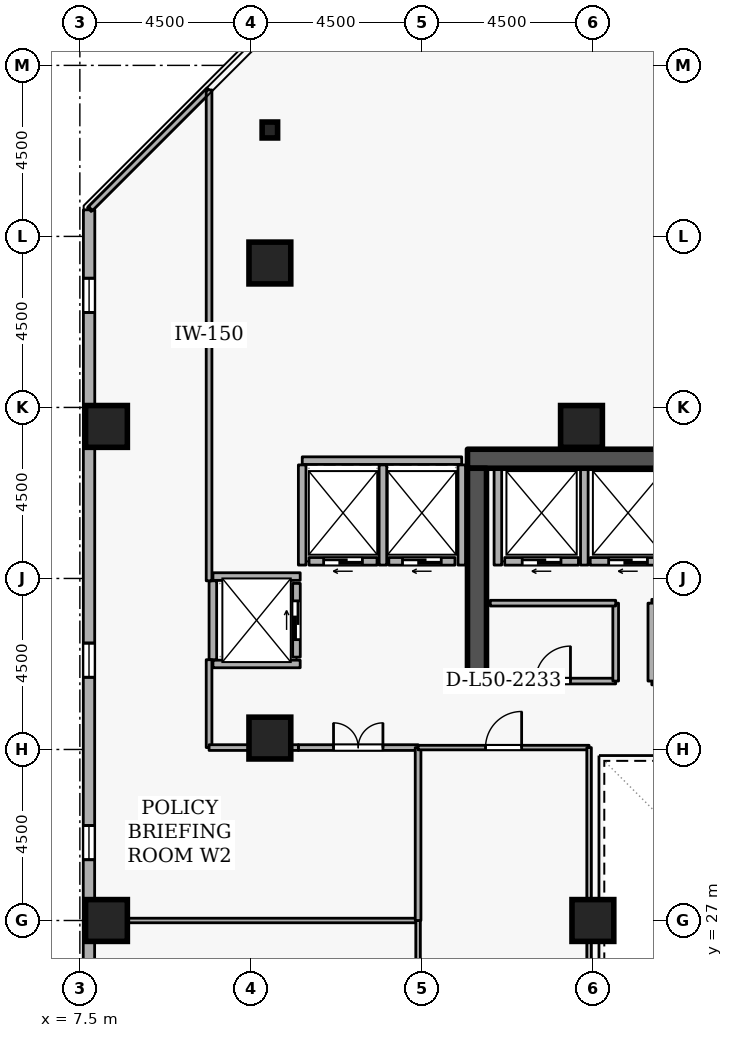
"""IFC4 building model, lengths in metres.
Left out: names, types, materials, properties, quantities, classifications, styles, units other than length and angle.
Written with IfcOpenShell. Run it as: python <this file> out.ifc"""

import sys

from ifc_helpers import new_model, si_unit, direction, frame, frame_2d, origin, origin_2d, place, context, subcontext, project, spatial, rectangle, i_section, extrude, element, fill, save


model = new_model("IFC4")
c1 = context("Model", 3, precision=1e-05, world=origin(), true_north=direction((0.0, 1.0)))
c2 = subcontext(c1, "Body", "Model", "MODEL_VIEW")
j1 = project(units=[si_unit("LENGTHUNIT", "METRE"), si_unit("PLANEANGLEUNIT", "RADIAN")], contexts=[c1])
p1 = place(None, origin())
s1 = spatial("IfcSite", under=j1, at=p1, CompositionType="ELEMENT")
p2 = place(p1, origin())
s2 = spatial("IfcBuilding", under=s1, at=p2, CompositionType="ELEMENT")
p3 = place(p2, frame((0.0, 0.0, 189.3)))
s3 = spatial("IfcBuildingStorey", under=s2, at=p3, CompositionType="ELEMENT", Elevation=189.3)
p4 = place(p3, frame((17.7, 39.15, 0.0), z_axis=(0.0, 0.0, 1.0), x_axis=(1.0, 0.0, 0.0)))
e1 = element("IfcWall", 1, at=p4, inside=s3, PredefinedType="SHEAR", context=c2, shape_type="SweptSolid", body=[
    extrude(rectangle(XDim=15.6, YDim=0.5, at=frame_2d((7.8, 0.0))), origin(), (0.0, 0.0, 1.0), 3.6),
])
p5 = place(p3, frame((17.95, 33.1, 0.0), z_axis=(0.0, 0.0, 1.0), x_axis=(0.0, 1.0, 0.0)))
e2 = element("IfcWall", 2, at=p5, inside=s3, PredefinedType="SHEAR", context=c2, shape_type="SweptSolid", body=[
    extrude(rectangle(XDim=5.8, YDim=0.5, at=frame_2d((2.9, 0.0))), origin(), (0.0, 0.0, 1.0), 3.6),
])
for number, where, z_axis, x_axis in (
    (3, (12.5, 44.3, 0.0), (0.0, 0.0, 1.0), (1.0, 0.0, 0.0)),
    (4, (8.2, 27.0, 0.0), (0.0, 0.0, 1.0), (1.0, 0.0, 0.0)),
    (5, (8.2, 40.0, 0.0), (0.0, 0.0, 1.0), (1.0, 0.0, 0.0)),
    (6, (12.5, 31.8, 0.0), (0.0, 0.0, 1.0), (1.0, 0.0, 0.0)),
    (7, (20.7, 40.0, 0.0), (0.0, 0.0, 1.0), (1.0, 0.0, 0.0)),
    (8, (21.0, 27.0, 0.0), (0.0, 0.0, 1.0), (1.0, 0.0, 0.0)),
):
    element("IfcColumn", number, at=place(p3, frame(where, z_axis=z_axis, x_axis=x_axis)), inside=s3, PredefinedType="COLUMN", context=c2, shape_type="SweptSolid", body=[
        extrude(rectangle(XDim=1.1, YDim=1.1, at=origin_2d()), origin(), (0.0, 0.0, 1.0), 3.6),
    ])
p6 = place(p3, frame((12.5, 47.8, 0.0), z_axis=(0.0, 0.0, 1.0), x_axis=(1.0, 0.0, 0.0)))
e9 = element("IfcColumn", 9, at=p6, inside=s3, PredefinedType="COLUMN", context=c2, shape_type="SweptSolid", body=[
    extrude(i_section(OverallWidth=0.407, OverallDepth=0.419, WebThickness=0.031, FlangeThickness=0.049, FilletRadius=0.015, at=origin_2d()), origin(), (0.0, 0.0, 1.0), 3.6),
])
p7 = place(p3, frame((7.744, 45.699, 0.0), z_axis=(0.0, 0.0, 1.0), x_axis=(-0.000244999128, -0.999999969988, 0.0)))
e10 = element("IfcWall", 10, at=p7, inside=s3, PredefinedType="STANDARD", context=c2, shape_type="SweptSolid", body=[
    extrude(rectangle(XDim=33.881, YDim=0.3, at=frame_2d((16.94, 0.0))), origin(), (0.0, 0.0, 1.0), 2.7),
])
p8 = place(p7, frame((1.8, 0.0, 0.72)))
e11 = element("IfcOpeningElement", 11, at=p8, cuts=e10, PredefinedType="OPENING", context=c2, shape_type="SweptSolid", body=[
    extrude(rectangle(XDim=0.9, YDim=1.75, at=frame_2d((0.45, 0.875))), frame((0.0, 0.16, 0.0), z_axis=(0.0, -1.0, 0.0), x_axis=(1.0, 0.0, 0.0)), (0.0, 0.0, 1.0), 0.32),
])
p9 = place(p7, frame((11.4, 0.0, 0.72)))
e12 = element("IfcOpeningElement", 12, at=p9, cuts=e10, PredefinedType="OPENING", context=c2, shape_type="SweptSolid", body=[
    extrude(rectangle(XDim=0.9, YDim=1.75, at=frame_2d((0.45, 0.875))), frame((0.0, 0.16, 0.0), z_axis=(0.0, -1.0, 0.0), x_axis=(1.0, 0.0, 0.0)), (0.0, 0.0, 1.0), 0.32),
])
p10 = place(p7, frame((16.2, 0.0, 0.72)))
e13 = element("IfcOpeningElement", 13, at=p10, cuts=e10, PredefinedType="OPENING", context=c2, shape_type="SweptSolid", body=[
    extrude(rectangle(XDim=0.9, YDim=1.75, at=frame_2d((0.45, 0.875))), frame((0.0, 0.16, 0.0), z_axis=(0.0, -1.0, 0.0), x_axis=(1.0, 0.0, 0.0)), (0.0, 0.0, 1.0), 0.32),
])
p11 = place(p7, frame((21.0, 0.0, 0.72)))
e14 = element("IfcOpeningElement", 14, at=p11, cuts=e10, PredefinedType="OPENING", context=c2, shape_type="SweptSolid", body=[
    extrude(rectangle(XDim=0.9, YDim=1.75, at=frame_2d((0.45, 0.875))), frame((0.0, 0.16, 0.0), z_axis=(0.0, -1.0, 0.0), x_axis=(1.0, 0.0, 0.0)), (0.0, 0.0, 1.0), 0.32),
])
p12 = place(p7, frame((25.8, 0.0, 0.72)))
e15 = element("IfcOpeningElement", 15, at=p12, cuts=e10, PredefinedType="OPENING", context=c2, shape_type="SweptSolid", body=[
    extrude(rectangle(XDim=0.9, YDim=1.75, at=frame_2d((0.45, 0.875))), frame((0.0, 0.16, 0.0), z_axis=(0.0, -1.0, 0.0), x_axis=(1.0, 0.0, 0.0)), (0.0, 0.0, 1.0), 0.32),
])
p13 = place(p3, frame((22.92, 36.45, 0.0), z_axis=(0.0, 0.0, 1.0), x_axis=(-1.0, 0.0, 0.0)))
e16 = element("IfcWall", 16, at=p13, inside=s3, PredefinedType="STANDARD", context=c2, shape_type="SweptSolid", body=[
    extrude(rectangle(XDim=1.99, YDim=0.2, at=frame_2d((0.995, 0.0))), origin(), (0.0, 0.0, 1.0), 3.34),
])
p14 = place(p13, frame((0.485, 0.0, 0.0)))
e17 = element("IfcOpeningElement", 17, at=p14, cuts=e16, PredefinedType="OPENING", context=c2, shape_type="SweptSolid", body=[
    extrude(rectangle(XDim=1.02, YDim=2.06, at=frame_2d((0.51, 1.03))), frame((0.0, 0.11, 0.0), z_axis=(0.0, -1.0, 0.0), x_axis=(1.0, 0.0, 0.0)), (0.0, 0.0, 1.0), 0.22),
])
p15 = place(p3, frame((20.62, 36.45, 0.0), z_axis=(0.0, 0.0, 1.0), x_axis=(-1.0, 0.0, 0.0)))
e18 = element("IfcWall", 18, at=p15, inside=s3, PredefinedType="STANDARD", context=c2, shape_type="SweptSolid", body=[
    extrude(rectangle(XDim=1.94, YDim=0.2, at=frame_2d((0.97, 0.0))), origin(), (0.0, 0.0, 1.0), 3.34),
])
p16 = place(p15, frame((0.46, 0.0, 0.0)))
e19 = element("IfcOpeningElement", 19, at=p16, cuts=e18, PredefinedType="OPENING", context=c2, shape_type="SweptSolid", body=[
    extrude(rectangle(XDim=1.02, YDim=2.06, at=frame_2d((0.51, 1.03))), frame((0.0, 0.11, 0.0), z_axis=(0.0, -1.0, 0.0), x_axis=(1.0, 0.0, 0.0)), (0.0, 0.0, 1.0), 0.22),
])
p17 = place(p3, frame((17.37, 36.45, 0.0), z_axis=(0.0, 0.0, 1.0), x_axis=(-1.0, 0.0, 0.0)))
e20 = element("IfcWall", 20, at=p17, inside=s3, PredefinedType="STANDARD", context=c2, shape_type="SweptSolid", body=[
    extrude(rectangle(XDim=1.74, YDim=0.2, at=frame_2d((0.87, 0.0))), origin(), (0.0, 0.0, 1.0), 3.34),
])
p18 = place(p17, frame((0.36, 0.0, 0.0)))
e21 = element("IfcOpeningElement", 21, at=p18, cuts=e20, PredefinedType="OPENING", context=c2, shape_type="SweptSolid", body=[
    extrude(rectangle(XDim=1.02, YDim=2.06, at=frame_2d((0.51, 1.03))), frame((0.0, 0.11, 0.0), z_axis=(0.0, -1.0, 0.0), x_axis=(1.0, 0.0, 0.0)), (0.0, 0.0, 1.0), 0.22),
])
p19 = place(p3, frame((15.32, 36.45, 0.0), z_axis=(0.0, 0.0, 1.0), x_axis=(-1.0, 0.0, 0.0)))
e22 = element("IfcWall", 22, at=p19, inside=s3, PredefinedType="STANDARD", context=c2, shape_type="SweptSolid", body=[
    extrude(rectangle(XDim=1.79, YDim=0.2, at=frame_2d((0.895, 0.0))), origin(), (0.0, 0.0, 1.0), 3.34),
])
p20 = place(p19, frame((0.385, 0.0, 0.0)))
e23 = element("IfcOpeningElement", 23, at=p20, cuts=e22, PredefinedType="OPENING", context=c2, shape_type="SweptSolid", body=[
    extrude(rectangle(XDim=1.02, YDim=2.06, at=frame_2d((0.51, 1.03))), frame((0.0, 0.11, 0.0), z_axis=(0.0, -1.0, 0.0), x_axis=(1.0, 0.0, 0.0)), (0.0, 0.0, 1.0), 0.22),
])
p21 = place(p3, frame((13.2, 33.93, 0.0), z_axis=(0.0, 0.0, 1.0), x_axis=(0.0, 1.0, 0.0)))
e24 = element("IfcWall", 24, at=p21, inside=s3, PredefinedType="STANDARD", context=c2, shape_type="SweptSolid", body=[
    extrude(rectangle(XDim=1.94, YDim=0.2, at=frame_2d((0.97, 0.0))), origin(), (0.0, 0.0, 1.0), 3.34),
])
p22 = place(p21, frame((0.46, 0.0, 0.0)))
e25 = element("IfcOpeningElement", 25, at=p22, cuts=e24, PredefinedType="OPENING", context=c2, shape_type="SweptSolid", body=[
    extrude(rectangle(XDim=1.02, YDim=2.06, at=frame_2d((0.51, 1.03))), frame((0.0, 0.11, 0.0), z_axis=(0.0, -1.0, 0.0), x_axis=(1.0, 0.0, 0.0)), (0.0, 0.0, 1.0), 0.22),
])
for number, where, z_axis, x_axis in (
    (26, (20.775, 36.352, 0.0), (0.0, 0.0, 1.0), (0.0, 1.0, 0.0)),
    (27, (18.5, 36.352, 0.0), (0.0, 0.0, 1.0), (0.0, 1.0, 0.0)),
):
    element("IfcWall", number, at=place(p3, frame(where, z_axis=z_axis, x_axis=x_axis)), inside=s3, PredefinedType="STANDARD", context=c2, shape_type="SweptSolid", body=[
        extrude(rectangle(XDim=2.536, YDim=0.2, at=frame_2d((1.268, 0.0))), origin(), (0.0, 0.0, 1.0), 3.34),
    ])
p23 = place(p3, frame((13.352, 39.1, 0.0), z_axis=(0.0, 0.0, 1.0), x_axis=(1.0, 0.0, 0.0)))
e28 = element("IfcWall", 28, at=p23, inside=s3, PredefinedType="STANDARD", context=c2, shape_type="SweptSolid", body=[
    extrude(rectangle(XDim=4.196, YDim=0.2, at=frame_2d((2.098, 0.0))), origin(), (0.0, 0.0, 1.0), 3.34),
])
p24 = place(p3, frame((17.55, 36.352, 0.0), z_axis=(0.0, 0.0, 1.0), x_axis=(0.0, 1.0, 0.0)))
e29 = element("IfcWall", 29, at=p24, inside=s3, PredefinedType="STANDARD", context=c2, shape_type="SweptSolid", body=[
    extrude(rectangle(XDim=2.636, YDim=0.2, at=frame_2d((1.318, 0.0))), origin(), (0.0, 0.0, 1.0), 2.545),
])
for number, where, z_axis, x_axis in (
    (30, (15.475, 36.352, 0.0), (0.0, 0.0, 1.0), (0.0, 1.0, 0.0)),
    (31, (13.35, 36.352, 0.0), (0.0, 0.0, 1.0), (0.0, 1.0, 0.0)),
):
    element("IfcWall", number, at=place(p3, frame(where, z_axis=z_axis, x_axis=x_axis)), inside=s3, PredefinedType="STANDARD", context=c2, shape_type="SweptSolid", body=[
        extrude(rectangle(XDim=2.636, YDim=0.2, at=frame_2d((1.318, 0.0))), origin(), (0.0, 0.0, 1.0), 3.34),
    ])
for number, where, z_axis, x_axis in (
    (32, (11.002, 36.05, 0.0), (0.0, 0.0, 1.0), (1.0, 0.0, 0.0)),
    (33, (11.002, 33.75, 0.0), (0.0, 0.0, 1.0), (1.0, 0.0, 0.0)),
):
    element("IfcWall", number, at=place(p3, frame(where, z_axis=z_axis, x_axis=x_axis)), inside=s3, PredefinedType="STANDARD", context=c2, shape_type="SweptSolid", body=[
        extrude(rectangle(XDim=2.296, YDim=0.2, at=frame_2d((1.148, 0.0))), origin(), (0.0, 0.0, 1.0), 3.34),
    ])
p25 = place(p3, frame((11.0, 33.862, 0.0), z_axis=(0.0, 0.0, 1.0), x_axis=(0.0, 1.0, 0.0)))
e34 = element("IfcWall", 34, at=p25, inside=s3, PredefinedType="STANDARD", context=c2, shape_type="SweptSolid", body=[
    extrude(rectangle(XDim=2.076, YDim=0.2, at=frame_2d((1.038, 0.0))), origin(), (0.0, 0.0, 1.0), 3.34),
])
p26 = place(p3, frame((22.55, 33.3, 0.0), z_axis=(0.0, 0.0, 1.0), x_axis=(1.0, 0.0, 0.0)))
e35 = element("IfcWall", 35, at=p26, inside=s3, PredefinedType="STANDARD", context=c2, shape_type="SweptSolid", body=[
    extrude(rectangle(XDim=1.8, YDim=0.2, at=frame_2d((0.9, 0.0))), origin(), (0.0, 0.0, 1.0), 3.34),
])
p27 = place(p26, frame((0.46, 0.0, 0.0)))
e36 = element("IfcOpeningElement", 36, at=p27, cuts=e35, PredefinedType="OPENING", context=c2, shape_type="SweptSolid", body=[
    extrude(rectangle(XDim=0.88, YDim=2.04, at=frame_2d((0.44, 1.02))), frame((0.0, 0.11, 0.0), z_axis=(0.0, -1.0, 0.0), x_axis=(1.0, 0.0, 0.0)), (0.0, 0.0, 1.0), 0.22),
])
p28 = place(p3, frame((24.35, 35.35, 0.0), z_axis=(0.0, 0.0, 1.0), x_axis=(-1.0, 0.0, 0.0)))
e37 = element("IfcWall", 37, at=p28, inside=s3, PredefinedType="STANDARD", context=c2, shape_type="SweptSolid", body=[
    extrude(rectangle(XDim=1.8, YDim=0.2, at=frame_2d((0.9, 0.0))), origin(), (0.0, 0.0, 1.0), 3.34),
])
p29 = place(p3, frame((22.55, 35.35, 0.0), z_axis=(0.0, 0.0, 1.0), x_axis=(0.0, -1.0, 0.0)))
e38 = element("IfcWall", 38, at=p29, inside=s3, PredefinedType="STANDARD", context=c2, shape_type="SweptSolid", body=[
    extrude(rectangle(XDim=2.05, YDim=0.2, at=frame_2d((1.025, 0.0))), origin(), (0.0, 0.0, 1.0), 3.34),
])
p30 = place(p3, frame((18.3, 33.3, 0.0), z_axis=(0.0, 0.0, 1.0), x_axis=(1.0, 0.0, 0.0)))
e39 = element("IfcWall", 39, at=p30, inside=s3, PredefinedType="PARTITIONING", context=c2, shape_type="SweptSolid", body=[
    extrude(rectangle(XDim=3.3, YDim=0.15, at=frame_2d((1.65, 0.0))), origin(), (0.0, 0.0, 1.0), 3.34),
])
p31 = place(p30, frame((1.19, 0.0, 0.0)))
e40 = element("IfcOpeningElement", 40, at=p31, cuts=e39, PredefinedType="OPENING", context=c2, shape_type="SweptSolid", body=[
    extrude(rectangle(XDim=0.92, YDim=2.08, at=frame_2d((0.46, 1.04))), frame((0.0, 0.085, 0.0), z_axis=(0.0, -1.0, 0.0), x_axis=(1.0, 0.0, 0.0)), (0.0, 0.0, 1.0), 0.17),
])
p32 = place(p3, frame((21.6, 33.3, 0.0), z_axis=(0.0, 0.0, 1.0), x_axis=(0.0, 1.0, 0.0)))
e41 = element("IfcWall", 41, at=p32, inside=s3, PredefinedType="PARTITIONING", context=c2, shape_type="SweptSolid", body=[
    extrude(rectangle(XDim=2.05, YDim=0.15, at=frame_2d((1.025, 0.0))), origin(), (0.0, 0.0, 1.0), 3.34),
])
p33 = place(p3, frame((21.6, 35.35, 0.0), z_axis=(0.0, 0.0, 1.0), x_axis=(-1.0, 0.0, 0.0)))
e42 = element("IfcWall", 42, at=p33, inside=s3, PredefinedType="PARTITIONING", context=c2, shape_type="SweptSolid", body=[
    extrude(rectangle(XDim=3.3, YDim=0.15, at=frame_2d((1.65, 0.0))), origin(), (0.0, 0.0, 1.0), 3.34),
])
p34 = place(p3, frame((7.78, 27.0, 0.0), z_axis=(0.0, 0.0, 1.0), x_axis=(1.0, 0.0, 0.0)))
e43 = element("IfcWall", 43, at=p34, inside=s3, PredefinedType="PARTITIONING", context=c2, shape_type="SweptSolid", body=[
    extrude(rectangle(XDim=8.62, YDim=0.12, at=frame_2d((4.31, 0.0))), origin(), (0.0, 0.0, 1.0), 2.878),
])
p35 = place(p3, frame((16.4, 27.0, 0.0), z_axis=(0.0, 0.0, 1.0), x_axis=(0.0, -1.0, 0.0)))
e44 = element("IfcWall", 44, at=p35, inside=s3, PredefinedType="PARTITIONING", context=c2, shape_type="SweptSolid", body=[
    extrude(rectangle(XDim=4.55, YDim=0.12, at=frame_2d((2.275, 0.0))), origin(), (0.0, 0.0, 1.0), 3.34),
])
p36 = place(p3, frame((13.25, 31.55, 0.0), z_axis=(0.0, 0.0, 1.0), x_axis=(1.0, 0.0, 0.0)))
e45 = element("IfcWall", 45, at=p36, inside=s3, PredefinedType="PARTITIONING", context=c2, shape_type="SweptSolid", body=[
    extrude(rectangle(XDim=3.15, YDim=0.15, at=frame_2d((1.575, 0.0))), origin(), (0.0, 0.0, 1.0), 3.34),
])
p37 = place(p36, frame((0.925, 0.0, 0.0)))
e46 = element("IfcOpeningElement", 46, at=p37, cuts=e45, PredefinedType="OPENING", context=c2, shape_type="SweptSolid", body=[
    extrude(rectangle(XDim=1.3, YDim=2.12, at=frame_2d((0.65, 1.06))), frame((0.0, 0.085, 0.0), z_axis=(0.0, -1.0, 0.0), x_axis=(1.0, 0.0, 0.0)), (0.0, 0.0, 1.0), 0.17),
])
p38 = place(p3, frame((16.4, 31.55, 0.0), z_axis=(0.0, 0.0, 1.0), x_axis=(0.0, -1.0, 0.0)))
e47 = element("IfcWall", 47, at=p38, inside=s3, PredefinedType="PARTITIONING", context=c2, shape_type="SweptSolid", body=[
    extrude(rectangle(XDim=4.55, YDim=0.15, at=frame_2d((2.275, 0.0))), origin(), (0.0, 0.0, 1.0), 3.34),
])
p39 = place(p3, frame((7.78, 45.733, 0.0), z_axis=(0.0, 0.0, 1.0), x_axis=(0.707079114978, 0.707134446312, 0.0)))
e48 = element("IfcWall", 48, at=p39, inside=s3, PredefinedType="PARTITIONING", context=c2, shape_type="SweptSolid", body=[
    extrude(rectangle(XDim=4.412, YDim=0.15, at=frame_2d((2.206, 0.0))), origin(), (0.0, 0.0, 1.0), 3.34),
])
p40 = place(p3, frame((10.9, 48.854, 0.0), z_axis=(0.0, 0.0, 1.0), x_axis=(0.0, -1.0, 0.0)))
e49 = element("IfcWall", 49, at=p40, inside=s3, PredefinedType="PARTITIONING", context=c2, shape_type="SweptSolid", body=[
    extrude(rectangle(XDim=12.916, YDim=0.15, at=frame_2d((6.458, 0.0))), origin(), (0.0, 0.0, 1.0), 3.34),
])
p41 = place(p3, frame((10.9, 33.862, 0.0), z_axis=(0.0, 0.0, 1.0), x_axis=(0.0, -1.0, 0.0)))
e50 = element("IfcWall", 50, at=p41, inside=s3, PredefinedType="PARTITIONING", context=c2, shape_type="SweptSolid", body=[
    extrude(rectangle(XDim=2.312, YDim=0.15, at=frame_2d((1.156, 0.0))), origin(), (0.0, 0.0, 1.0), 3.34),
])
p42 = place(p3, frame((10.9, 31.55, 0.0), z_axis=(0.0, 0.0, 1.0), x_axis=(1.0, 0.0, 0.0)))
e51 = element("IfcWall", 51, at=p42, inside=s3, PredefinedType="PARTITIONING", context=c2, shape_type="SweptSolid", body=[
    extrude(rectangle(XDim=2.35, YDim=0.15, at=frame_2d((1.175, 0.0))), origin(), (0.0, 0.0, 1.0), 3.34),
])
p43 = place(p3, frame((16.4, 31.55, 0.0), z_axis=(0.0, 0.0, 1.0), x_axis=(1.0, 0.0, 0.0)))
e52 = element("IfcWall", 52, at=p43, inside=s3, PredefinedType="PARTITIONING", context=c2, shape_type="SweptSolid", body=[
    extrude(rectangle(XDim=4.5, YDim=0.12, at=frame_2d((2.25, 0.0))), origin(), (0.0, 0.0, 1.0), 3.34),
])
p44 = place(p43, frame((1.775, 0.0, 0.0)))
e53 = element("IfcOpeningElement", 53, at=p44, cuts=e52, PredefinedType="OPENING", context=c2, shape_type="SweptSolid", body=[
    extrude(rectangle(XDim=0.95, YDim=2.1, at=frame_2d((0.475, 1.05))), frame((0.0, 0.07, 0.0), z_axis=(0.0, -1.0, 0.0), x_axis=(1.0, 0.0, 0.0)), (0.0, 0.0, 1.0), 0.14),
])
p45 = place(p3, frame((20.9, 31.55, 0.0), z_axis=(0.0, 0.0, 1.0), x_axis=(0.0, -1.0, 0.0)))
e54 = element("IfcWall", 54, at=p45, inside=s3, PredefinedType="PARTITIONING", context=c2, shape_type="SweptSolid", body=[
    extrude(rectangle(XDim=9.1, YDim=0.12, at=frame_2d((4.55, 0.0))), origin(), (0.0, 0.0, 1.0), 3.34),
])
p46 = place(p8, origin())
e55 = element("IfcWindow", 55, at=p46, inside=s3, PartitioningType="SINGLE_PANEL", PredefinedType="WINDOW", context=c2, shape_type="SweptSolid", body=[
    extrude(rectangle(XDim=0.9, YDim=1.75, at=frame_2d((0.45, 0.875))), frame((0.0, 0.03, 0.0), z_axis=(0.0, -1.0, 0.0), x_axis=(1.0, 0.0, 0.0)), (0.0, 0.0, 1.0), 0.06),
])
fill(e11, e55)
p47 = place(p9, origin())
e56 = element("IfcWindow", 56, at=p47, inside=s3, PartitioningType="SINGLE_PANEL", PredefinedType="WINDOW", context=c2, shape_type="SweptSolid", body=[
    extrude(rectangle(XDim=0.9, YDim=1.75, at=frame_2d((0.45, 0.875))), frame((0.0, 0.03, 0.0), z_axis=(0.0, -1.0, 0.0), x_axis=(1.0, 0.0, 0.0)), (0.0, 0.0, 1.0), 0.06),
])
fill(e12, e56)
p48 = place(p10, origin())
e57 = element("IfcWindow", 57, at=p48, inside=s3, PartitioningType="SINGLE_PANEL", PredefinedType="WINDOW", context=c2, shape_type="SweptSolid", body=[
    extrude(rectangle(XDim=0.9, YDim=1.75, at=frame_2d((0.45, 0.875))), frame((0.0, 0.03, 0.0), z_axis=(0.0, -1.0, 0.0), x_axis=(1.0, 0.0, 0.0)), (0.0, 0.0, 1.0), 0.06),
])
fill(e13, e57)
p49 = place(p14, origin())
e58 = element("IfcDoor", 58, at=p49, inside=s3, OperationType="SLIDING_TO_LEFT", PredefinedType="DOOR", context=c2, shape_type="SweptSolid", body=[
    extrude(rectangle(XDim=1.02, YDim=2.06, at=frame_2d((0.51, 1.03))), frame((0.0, 0.025, 0.0), z_axis=(0.0, -1.0, 0.0), x_axis=(1.0, 0.0, 0.0)), (0.0, 0.0, 1.0), 0.05),
])
fill(e17, e58)
p50 = place(p16, origin())
e59 = element("IfcDoor", 59, at=p50, inside=s3, OperationType="SLIDING_TO_LEFT", PredefinedType="DOOR", context=c2, shape_type="SweptSolid", body=[
    extrude(rectangle(XDim=1.02, YDim=2.06, at=frame_2d((0.51, 1.03))), frame((0.0, 0.025, 0.0), z_axis=(0.0, -1.0, 0.0), x_axis=(1.0, 0.0, 0.0)), (0.0, 0.0, 1.0), 0.05),
])
fill(e19, e59)
p51 = place(p18, origin())
e60 = element("IfcDoor", 60, at=p51, inside=s3, OperationType="SLIDING_TO_LEFT", PredefinedType="DOOR", context=c2, shape_type="SweptSolid", body=[
    extrude(rectangle(XDim=1.02, YDim=2.06, at=frame_2d((0.51, 1.03))), frame((0.0, 0.025, 0.0), z_axis=(0.0, -1.0, 0.0), x_axis=(1.0, 0.0, 0.0)), (0.0, 0.0, 1.0), 0.05),
])
fill(e21, e60)
p52 = place(p20, origin())
e61 = element("IfcDoor", 61, at=p52, inside=s3, OperationType="SLIDING_TO_LEFT", PredefinedType="DOOR", context=c2, shape_type="SweptSolid", body=[
    extrude(rectangle(XDim=1.02, YDim=2.06, at=frame_2d((0.51, 1.03))), frame((0.0, 0.025, 0.0), z_axis=(0.0, -1.0, 0.0), x_axis=(1.0, 0.0, 0.0)), (0.0, 0.0, 1.0), 0.05),
])
fill(e23, e61)
p53 = place(p22, origin())
e62 = element("IfcDoor", 62, at=p53, inside=s3, OperationType="SLIDING_TO_LEFT", PredefinedType="DOOR", context=c2, shape_type="SweptSolid", body=[
    extrude(rectangle(XDim=1.02, YDim=2.06, at=frame_2d((0.51, 1.03))), frame((0.0, 0.025, 0.0), z_axis=(0.0, -1.0, 0.0), x_axis=(1.0, 0.0, 0.0)), (0.0, 0.0, 1.0), 0.05),
])
fill(e25, e62)
p54 = place(p31, origin())
e63 = element("IfcDoor", 63, at=p54, inside=s3, OperationType="SINGLE_SWING_RIGHT", PredefinedType="DOOR", context=c2, shape_type="SweptSolid", body=[
    extrude(rectangle(XDim=0.92, YDim=2.08, at=frame_2d((0.46, 1.04))), frame((0.0, 0.025, 0.0), z_axis=(0.0, -1.0, 0.0), x_axis=(1.0, 0.0, 0.0)), (0.0, 0.0, 1.0), 0.05),
])
fill(e40, e63)
p55 = place(p37, origin())
e64 = element("IfcDoor", 64, at=p55, inside=s3, OperationType="DOUBLE_DOOR_SINGLE_SWING", PredefinedType="DOOR", context=c2, shape_type="SweptSolid", body=[
    extrude(rectangle(XDim=1.3, YDim=2.12, at=frame_2d((0.65, 1.06))), frame((0.0, 0.025, 0.0), z_axis=(0.0, -1.0, 0.0), x_axis=(1.0, 0.0, 0.0)), (0.0, 0.0, 1.0), 0.05),
])
fill(e46, e64)
p56 = place(p44, origin())
e65 = element("IfcDoor", 65, at=p56, inside=s3, OperationType="SINGLE_SWING_RIGHT", PredefinedType="DOOR", context=c2, shape_type="SweptSolid", body=[
    extrude(rectangle(XDim=0.95, YDim=2.1, at=frame_2d((0.475, 1.05))), frame((0.0, 0.025, 0.0), z_axis=(0.0, -1.0, 0.0), x_axis=(1.0, 0.0, 0.0)), (0.0, 0.0, 1.0), 0.05),
])
fill(e53, e65)
save(model, sys.argv[1])
